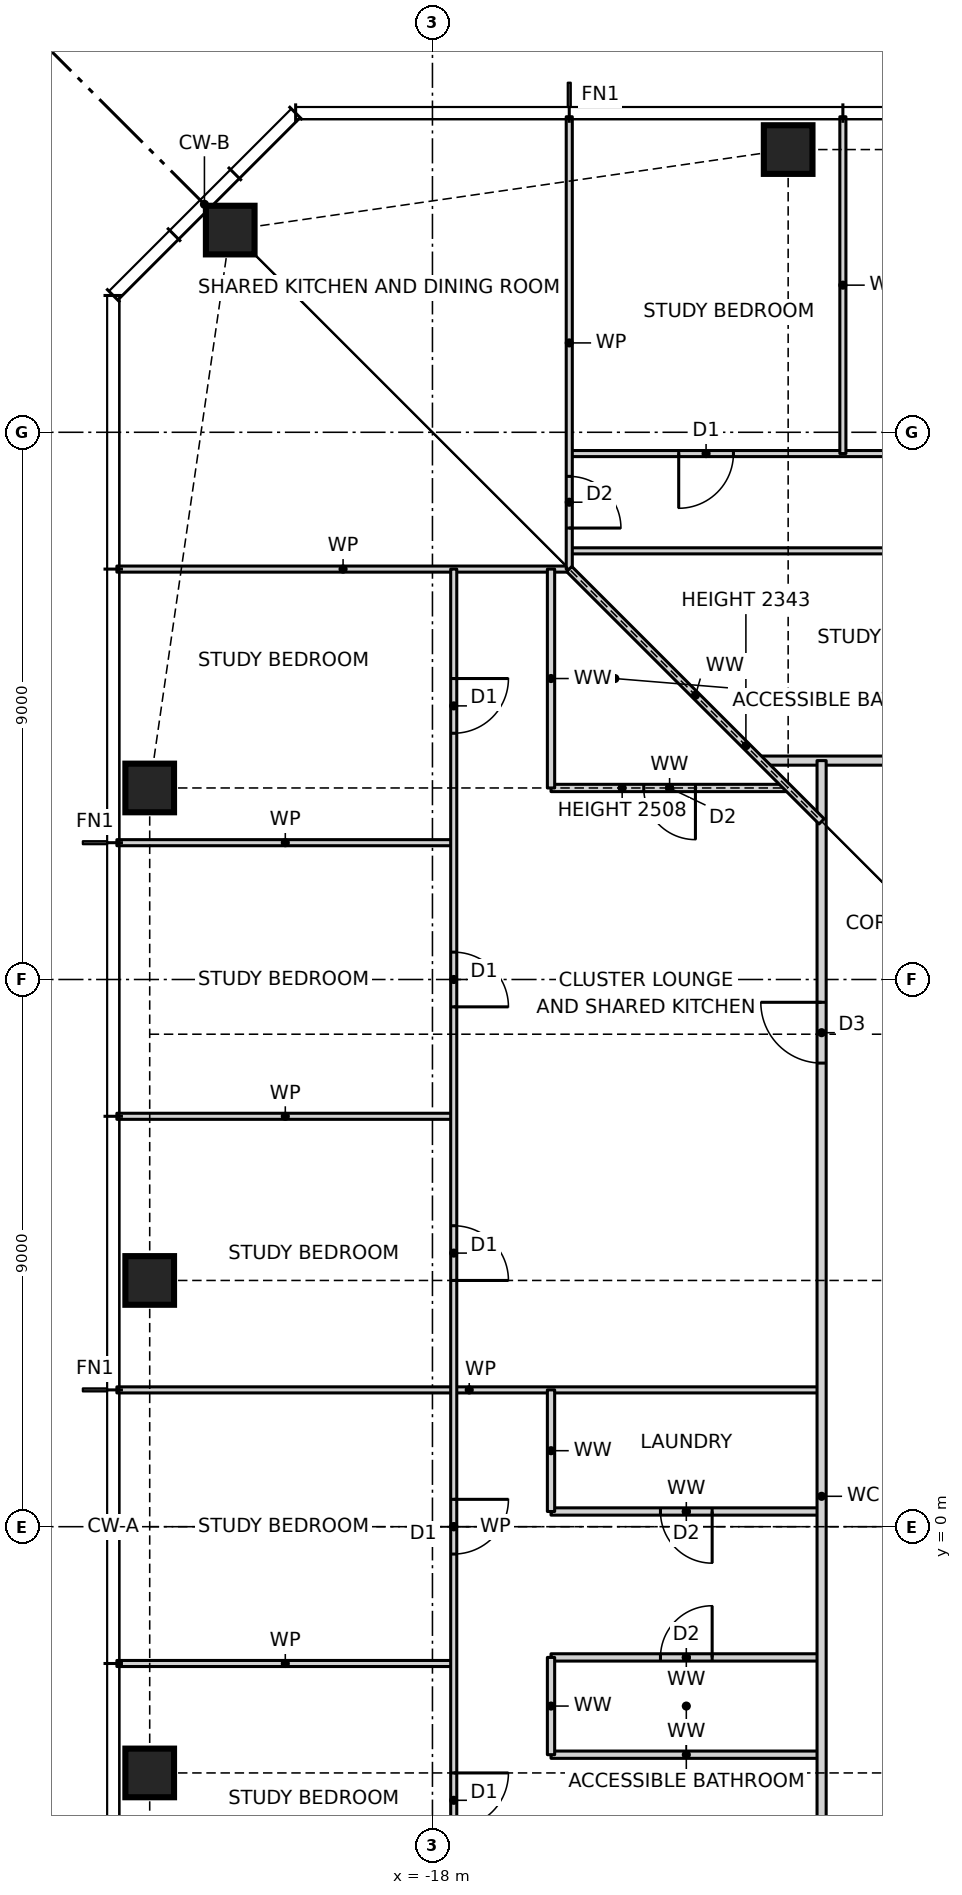
"""IFC4 building model, lengths in metres.
Left out: names, types, materials, properties, quantities, classifications, styles, units other than length and angle.
Written with IfcOpenShell. Run it as: python <this file> out.ifc"""

import sys

from ifc_helpers import new_model, si_unit, direction, frame, frame_2d, origin, origin_2d, place, context, subcontext, project, spatial, rectangle, hollow_rectangle, extrude, element, fill, save


model = new_model("IFC4")
c1 = context("Model", 3, precision=1e-05, world=origin(), true_north=direction((0.0, 1.0)))
c2 = subcontext(c1, "Body", "Model", "MODEL_VIEW")
j1 = project(units=[si_unit("LENGTHUNIT", "METRE"), si_unit("PLANEANGLEUNIT", "RADIAN")], contexts=[c1])
p1 = place(None, origin())
s1 = spatial("IfcSite", under=j1, at=p1, CompositionType="ELEMENT")
p2 = place(p1, origin())
s2 = spatial("IfcBuilding", under=s1, at=p2, CompositionType="ELEMENT")
p3 = place(p2, frame((0.0, 0.0, 64.0)))
s3 = spatial("IfcBuildingStorey", under=s2, at=p3, CompositionType="ELEMENT", Elevation=64.0)
for number, where, z_axis, x_axis in (
    (1, (-12.15, 22.65, 0.0), (0.0, 0.0, 1.0), (1.0, 0.0, 0.0)),
    (2, (-21.326, 21.326, 0.0), (0.0, 0.0, 1.0), (1.0, 0.0, 0.0)),
    (3, (-22.65, 12.15, 0.0), (0.0, 0.0, 1.0), (1.0, 0.0, 0.0)),
    (4, (-22.65, 4.05, 0.0), (0.0, 0.0, 1.0), (1.0, 0.0, 0.0)),
    (5, (-22.65, -4.05, 0.0), (0.0, 0.0, 1.0), (1.0, 0.0, 0.0)),
):
    element("IfcColumn", number, at=place(p3, frame(where, z_axis=z_axis, x_axis=x_axis)), inside=s3, PredefinedType="COLUMN", context=c2, shape_type="SweptSolid", body=[
        extrude(hollow_rectangle(XDim=0.8, YDim=0.8, WallThickness=0.09, at=origin_2d()), origin(), (0.0, 0.0, 1.0), 3.5),
    ])
p4 = place(p3, frame((-16.05, -3.75, 0.0), z_axis=(0.0, 0.0, 1.0), x_axis=(1.0, 0.0, 0.0)))
e6 = element("IfcWall", 6, at=p4, inside=s3, PredefinedType="PARTITIONING", context=c2, shape_type="SweptSolid", body=[
    extrude(rectangle(XDim=4.45, YDim=0.12, at=frame_2d((2.225, 0.0))), origin(), (0.0, 0.0, 1.0), 3.27),
])
p5 = place(p3, frame((-23.19, -2.25, 0.0), z_axis=(0.0, 0.0, 1.0), x_axis=(1.0, 0.0, 0.0)))
e7 = element("IfcWall", 7, at=p5, inside=s3, PredefinedType="PARTITIONING", context=c2, shape_type="SweptSolid", body=[
    extrude(rectangle(XDim=5.54, YDim=0.1, at=frame_2d((2.77, 0.0))), origin(), (0.0, 0.0, 1.0), 3.27),
])
p6 = place(p3, frame((-16.05, -2.15, 0.0), z_axis=(0.0, 0.0, 1.0), x_axis=(1.0, 0.0, 0.0)))
e8 = element("IfcWall", 8, at=p6, inside=s3, PredefinedType="PARTITIONING", context=c2, shape_type="SweptSolid", body=[
    extrude(rectangle(XDim=4.45, YDim=0.12, at=frame_2d((2.225, 0.0))), origin(), (0.0, 0.0, 1.0), 3.27),
])
p7 = place(p6, frame((1.8, 0.0, 0.0)))
e9 = element("IfcOpeningElement", 9, at=p7, cuts=e8, PredefinedType="OPENING", context=c2, shape_type="SweptSolid", body=[
    extrude(rectangle(XDim=0.85, YDim=2.1, at=frame_2d((0.425, 1.05))), frame((0.0, 0.07, 0.0), z_axis=(0.0, -1.0, 0.0), x_axis=(1.0, 0.0, 0.0)), (0.0, 0.0, 1.0), 0.14),
])
p8 = place(p3, frame((-16.05, 0.25, 0.0), z_axis=(0.0, 0.0, 1.0), x_axis=(1.0, 0.0, 0.0)))
e10 = element("IfcWall", 10, at=p8, inside=s3, PredefinedType="PARTITIONING", context=c2, shape_type="SweptSolid", body=[
    extrude(rectangle(XDim=4.45, YDim=0.12, at=frame_2d((2.225, 0.0))), origin(), (0.0, 0.0, 1.0), 3.27),
])
p9 = place(p8, frame((1.8, 0.0, 0.0)))
e11 = element("IfcOpeningElement", 11, at=p9, cuts=e10, PredefinedType="OPENING", context=c2, shape_type="SweptSolid", body=[
    extrude(rectangle(XDim=0.85, YDim=2.1, at=frame_2d((0.425, 1.05))), frame((0.0, 0.07, 0.0), z_axis=(0.0, -1.0, 0.0), x_axis=(1.0, 0.0, 0.0)), (0.0, 0.0, 1.0), 0.14),
])
p10 = place(p3, frame((-23.19, 2.25, 0.0), z_axis=(0.0, 0.0, 1.0), x_axis=(1.0, 0.0, 0.0)))
e12 = element("IfcWall", 12, at=p10, inside=s3, PredefinedType="PARTITIONING", context=c2, shape_type="SweptSolid", body=[
    extrude(rectangle(XDim=11.59, YDim=0.1, at=frame_2d((5.795, 0.0))), origin(), (0.0, 0.0, 1.0), 3.27),
])
for number, where, z_axis, x_axis in (
    (13, (-23.19, 6.75, 0.0), (0.0, 0.0, 1.0), (1.0, 0.0, 0.0)),
    (14, (-23.19, 11.25, 0.0), (0.0, 0.0, 1.0), (1.0, 0.0, 0.0)),
):
    element("IfcWall", number, at=place(p3, frame(where, z_axis=z_axis, x_axis=x_axis)), inside=s3, PredefinedType="PARTITIONING", context=c2, shape_type="SweptSolid", body=[
        extrude(rectangle(XDim=5.54, YDim=0.1, at=frame_2d((2.77, 0.0))), origin(), (0.0, 0.0, 1.0), 3.27),
    ])
p11 = place(p3, frame((-16.05, 12.15, 0.0), z_axis=(0.0, 0.0, 1.0), x_axis=(1.0, 0.0, 0.0)))
e15 = element("IfcWall", 15, at=p11, inside=s3, PredefinedType="PARTITIONING", context=c2, shape_type="SweptSolid", body=[
    extrude(rectangle(XDim=3.9, YDim=0.12, at=frame_2d((1.95, 0.0))), origin(), (0.0, 0.0, 1.0), 2.508),
])
p12 = place(p11, frame((1.525, 0.0, 0.0)))
e16 = element("IfcOpeningElement", 16, at=p12, cuts=e15, PredefinedType="OPENING", context=c2, shape_type="SweptSolid", body=[
    extrude(rectangle(XDim=0.85, YDim=2.1, at=frame_2d((0.425, 1.05))), frame((0.0, 0.07, 0.0), z_axis=(0.0, -1.0, 0.0), x_axis=(1.0, 0.0, 0.0)), (0.0, 0.0, 1.0), 0.14),
])
p13 = place(p3, frame((-12.6, 12.6, 0.0), z_axis=(0.0, 0.0, 1.0), x_axis=(1.0, 0.0, 0.0)))
e17 = element("IfcWall", 17, at=p13, inside=s3, PredefinedType="PARTITIONING", context=c2, shape_type="SweptSolid", body=[
    extrude(rectangle(XDim=25.2, YDim=0.15, at=frame_2d((12.6, 0.0))), origin(), (0.0, 0.0, 1.0), 3.27),
])
p14 = place(p13, frame((11.505, 0.0, 0.0)))
e18 = element("IfcOpeningElement", 18, at=p14, cuts=e17, PredefinedType="OPENING", context=c2, shape_type="SweptSolid", body=[
    extrude(rectangle(XDim=1.0, YDim=2.1, at=frame_2d((0.5, 1.05))), frame((0.0, 0.085, 0.0), z_axis=(0.0, -1.0, 0.0), x_axis=(1.0, 0.0, 0.0)), (0.0, 0.0, 1.0), 0.17),
])
p15 = place(p3, frame((-23.19, 15.75, 0.0), z_axis=(0.0, 0.0, 1.0), x_axis=(1.0, 0.0, 0.0)))
e19 = element("IfcWall", 19, at=p15, inside=s3, PredefinedType="PARTITIONING", context=c2, shape_type="SweptSolid", body=[
    extrude(rectangle(XDim=7.44, YDim=0.1, at=frame_2d((3.72, 0.0))), origin(), (0.0, 0.0, 1.0), 3.27),
])
p16 = place(p3, frame((-15.75, 16.05, 0.0), z_axis=(0.0, 0.0, 1.0), x_axis=(1.0, 0.0, 0.0)))
e20 = element("IfcWall", 20, at=p16, inside=s3, PredefinedType="PARTITIONING", context=c2, shape_type="SweptSolid", body=[
    extrude(rectangle(XDim=11.31, YDim=0.1, at=frame_2d((5.655, 0.0))), origin(), (0.0, 0.0, 1.0), 3.27),
])
p17 = place(p16, frame((5.23, 0.0, 0.0)))
e21 = element("IfcOpeningElement", 21, at=p17, cuts=e20, PredefinedType="OPENING", context=c2, shape_type="SweptSolid", body=[
    extrude(rectangle(XDim=0.85, YDim=2.1, at=frame_2d((0.425, 1.05))), frame((0.0, 0.06, 0.0), z_axis=(0.0, -1.0, 0.0), x_axis=(1.0, 0.0, 0.0)), (0.0, 0.0, 1.0), 0.12),
])
p18 = place(p3, frame((-15.75, 17.65, 0.0), z_axis=(0.0, 0.0, 1.0), x_axis=(1.0, 0.0, 0.0)))
e22 = element("IfcWall", 22, at=p18, inside=s3, PredefinedType="PARTITIONING", context=c2, shape_type="SweptSolid", body=[
    extrude(rectangle(XDim=27.0, YDim=0.1, at=frame_2d((13.5, 0.0))), origin(), (0.0, 0.0, 1.0), 3.27),
])
p19 = place(p18, frame((24.3, 0.0, 0.0)))
e23 = element("IfcOpeningElement", 23, at=p19, cuts=e22, PredefinedType="OPENING", context=c2, shape_type="SweptSolid", body=[
    extrude(rectangle(XDim=0.9, YDim=2.1, at=frame_2d((0.45, 1.05))), frame((0.0, 0.06, 0.0), z_axis=(0.0, -1.0, 0.0), x_axis=(1.0, 0.0, 0.0)), (0.0, 0.0, 1.0), 0.12),
])
p20 = place(p18, frame((19.8, 0.0, 0.0)))
e24 = element("IfcOpeningElement", 24, at=p20, cuts=e22, PredefinedType="OPENING", context=c2, shape_type="SweptSolid", body=[
    extrude(rectangle(XDim=0.9, YDim=2.1, at=frame_2d((0.45, 1.05))), frame((0.0, 0.06, 0.0), z_axis=(0.0, -1.0, 0.0), x_axis=(1.0, 0.0, 0.0)), (0.0, 0.0, 1.0), 0.12),
])
p21 = place(p18, frame((15.3, 0.0, 0.0)))
e25 = element("IfcOpeningElement", 25, at=p21, cuts=e22, PredefinedType="OPENING", context=c2, shape_type="SweptSolid", body=[
    extrude(rectangle(XDim=0.9, YDim=2.1, at=frame_2d((0.45, 1.05))), frame((0.0, 0.06, 0.0), z_axis=(0.0, -1.0, 0.0), x_axis=(1.0, 0.0, 0.0)), (0.0, 0.0, 1.0), 0.12),
])
p22 = place(p18, frame((10.8, 0.0, 0.0)))
e26 = element("IfcOpeningElement", 26, at=p22, cuts=e22, PredefinedType="OPENING", context=c2, shape_type="SweptSolid", body=[
    extrude(rectangle(XDim=0.9, YDim=2.1, at=frame_2d((0.45, 1.05))), frame((0.0, 0.06, 0.0), z_axis=(0.0, -1.0, 0.0), x_axis=(1.0, 0.0, 0.0)), (0.0, 0.0, 1.0), 0.12),
])
p23 = place(p18, frame((6.3, 0.0, 0.0)))
e27 = element("IfcOpeningElement", 27, at=p23, cuts=e22, PredefinedType="OPENING", context=c2, shape_type="SweptSolid", body=[
    extrude(rectangle(XDim=0.9, YDim=2.1, at=frame_2d((0.45, 1.05))), frame((0.0, 0.06, 0.0), z_axis=(0.0, -1.0, 0.0), x_axis=(1.0, 0.0, 0.0)), (0.0, 0.0, 1.0), 0.12),
])
p24 = place(p18, frame((1.8, 0.0, 0.0)))
e28 = element("IfcOpeningElement", 28, at=p24, cuts=e22, PredefinedType="OPENING", context=c2, shape_type="SweptSolid", body=[
    extrude(rectangle(XDim=0.9, YDim=2.1, at=frame_2d((0.45, 1.05))), frame((0.0, 0.06, 0.0), z_axis=(0.0, -1.0, 0.0), x_axis=(1.0, 0.0, 0.0)), (0.0, 0.0, 1.0), 0.12),
])
p25 = place(p3, frame((-11.25, 17.65, 0.0), z_axis=(0.0, 0.0, 1.0), x_axis=(0.0, 1.0, 0.0)))
e29 = element("IfcWall", 29, at=p25, inside=s3, PredefinedType="PARTITIONING", context=c2, shape_type="SweptSolid", body=[
    extrude(rectangle(XDim=5.54, YDim=0.1, at=frame_2d((2.77, 0.0))), origin(), (0.0, 0.0, 1.0), 3.27),
])
p26 = place(p3, frame((-11.6, -11.6, 0.0), z_axis=(0.0, 0.0, 1.0), x_axis=(0.0, 1.0, 0.0)))
e30 = element("IfcWall", 30, at=p26, inside=s3, PredefinedType="PARTITIONING", context=c2, shape_type="SweptSolid", body=[
    extrude(rectangle(XDim=24.2, YDim=0.15, at=frame_2d((12.1, 0.0))), origin(), (0.0, 0.0, 1.0), 3.27),
])
p27 = place(p26, frame((19.225, 0.0, 0.0)))
e31 = element("IfcOpeningElement", 31, at=p27, cuts=e30, PredefinedType="OPENING", context=c2, shape_type="SweptSolid", body=[
    extrude(rectangle(XDim=1.0, YDim=2.1, at=frame_2d((0.5, 1.05))), frame((0.0, 0.085, 0.0), z_axis=(0.0, -1.0, 0.0), x_axis=(1.0, 0.0, 0.0)), (0.0, 0.0, 1.0), 0.17),
])
p28 = place(p26, frame((3.425, 0.0, 0.0)))
e32 = element("IfcOpeningElement", 32, at=p28, cuts=e30, PredefinedType="OPENING", context=c2, shape_type="SweptSolid", body=[
    extrude(rectangle(XDim=1.0, YDim=2.1, at=frame_2d((0.5, 1.05))), frame((0.0, 0.085, 0.0), z_axis=(0.0, -1.0, 0.0), x_axis=(1.0, 0.0, 0.0)), (0.0, 0.0, 1.0), 0.17),
])
p29 = place(p3, frame((-15.75, 15.75, 0.0), z_axis=(0.0, 0.0, 1.0), x_axis=(0.0, 1.0, 0.0)))
e33 = element("IfcWall", 33, at=p29, inside=s3, PredefinedType="PARTITIONING", context=c2, shape_type="SweptSolid", body=[
    extrude(rectangle(XDim=7.44, YDim=0.1, at=frame_2d((3.72, 0.0))), origin(), (0.0, 0.0, 1.0), 3.27),
])
p30 = place(p29, frame((0.675, 0.0, 0.0)))
e34 = element("IfcOpeningElement", 34, at=p30, cuts=e33, PredefinedType="OPENING", context=c2, shape_type="SweptSolid", body=[
    extrude(rectangle(XDim=0.85, YDim=2.1, at=frame_2d((0.425, 1.05))), frame((0.0, 0.06, 0.0), z_axis=(0.0, -1.0, 0.0), x_axis=(1.0, 0.0, 0.0)), (0.0, 0.0, 1.0), 0.12),
])
p31 = place(p3, frame((-16.05, -3.75, 0.0), z_axis=(0.0, 0.0, 1.0), x_axis=(0.0, 1.0, 0.0)))
e35 = element("IfcWall", 35, at=p31, inside=s3, PredefinedType="PARTITIONING", context=c2, shape_type="SweptSolid", body=[
    extrude(rectangle(XDim=1.6, YDim=0.12, at=frame_2d((0.8, 0.0))), origin(), (0.0, 0.0, 1.0), 3.27),
])
p32 = place(p3, frame((-16.05, 0.25, 0.0), z_axis=(0.0, 0.0, 1.0), x_axis=(0.0, 1.0, 0.0)))
e36 = element("IfcWall", 36, at=p32, inside=s3, PredefinedType="PARTITIONING", context=c2, shape_type="SweptSolid", body=[
    extrude(rectangle(XDim=2.0, YDim=0.12, at=frame_2d((1.0, 0.0))), origin(), (0.0, 0.0, 1.0), 3.27),
])
p33 = place(p3, frame((-16.05, 12.15, 0.0), z_axis=(0.0, 0.0, 1.0), x_axis=(0.0, 1.0, 0.0)))
e37 = element("IfcWall", 37, at=p33, inside=s3, PredefinedType="PARTITIONING", context=c2, shape_type="SweptSolid", body=[
    extrude(rectangle(XDim=3.6, YDim=0.12, at=frame_2d((1.8, 0.0))), origin(), (0.0, 0.0, 1.0), 3.27),
])
p34 = place(p3, frame((-17.65, -15.75, 0.0), z_axis=(0.0, 0.0, 1.0), x_axis=(0.0, 1.0, 0.0)))
e38 = element("IfcWall", 38, at=p34, inside=s3, PredefinedType="PARTITIONING", context=c2, shape_type="SweptSolid", body=[
    extrude(rectangle(XDim=31.5, YDim=0.1, at=frame_2d((15.75, 0.0))), origin(), (0.0, 0.0, 1.0), 3.27),
])
p35 = place(p34, frame((28.8, 0.0, 0.0)))
e39 = element("IfcOpeningElement", 39, at=p35, cuts=e38, PredefinedType="OPENING", context=c2, shape_type="SweptSolid", body=[
    extrude(rectangle(XDim=0.9, YDim=2.1, at=frame_2d((0.45, 1.05))), frame((0.0, 0.06, 0.0), z_axis=(0.0, -1.0, 0.0), x_axis=(1.0, 0.0, 0.0)), (0.0, 0.0, 1.0), 0.12),
])
p36 = place(p34, frame((24.3, 0.0, 0.0)))
e40 = element("IfcOpeningElement", 40, at=p36, cuts=e38, PredefinedType="OPENING", context=c2, shape_type="SweptSolid", body=[
    extrude(rectangle(XDim=0.9, YDim=2.1, at=frame_2d((0.45, 1.05))), frame((0.0, 0.06, 0.0), z_axis=(0.0, -1.0, 0.0), x_axis=(1.0, 0.0, 0.0)), (0.0, 0.0, 1.0), 0.12),
])
p37 = place(p34, frame((19.8, 0.0, 0.0)))
e41 = element("IfcOpeningElement", 41, at=p37, cuts=e38, PredefinedType="OPENING", context=c2, shape_type="SweptSolid", body=[
    extrude(rectangle(XDim=0.9, YDim=2.1, at=frame_2d((0.45, 1.05))), frame((0.0, 0.06, 0.0), z_axis=(0.0, -1.0, 0.0), x_axis=(1.0, 0.0, 0.0)), (0.0, 0.0, 1.0), 0.12),
])
p38 = place(p34, frame((15.3, 0.0, 0.0)))
e42 = element("IfcOpeningElement", 42, at=p38, cuts=e38, PredefinedType="OPENING", context=c2, shape_type="SweptSolid", body=[
    extrude(rectangle(XDim=0.9, YDim=2.1, at=frame_2d((0.45, 1.05))), frame((0.0, 0.06, 0.0), z_axis=(0.0, -1.0, 0.0), x_axis=(1.0, 0.0, 0.0)), (0.0, 0.0, 1.0), 0.12),
])
p39 = place(p34, frame((10.8, 0.0, 0.0)))
e43 = element("IfcOpeningElement", 43, at=p39, cuts=e38, PredefinedType="OPENING", context=c2, shape_type="SweptSolid", body=[
    extrude(rectangle(XDim=0.9, YDim=2.1, at=frame_2d((0.45, 1.05))), frame((0.0, 0.06, 0.0), z_axis=(0.0, -1.0, 0.0), x_axis=(1.0, 0.0, 0.0)), (0.0, 0.0, 1.0), 0.12),
])
p40 = place(p34, frame((6.3, 0.0, 0.0)))
e44 = element("IfcOpeningElement", 44, at=p40, cuts=e38, PredefinedType="OPENING", context=c2, shape_type="SweptSolid", body=[
    extrude(rectangle(XDim=0.9, YDim=2.1, at=frame_2d((0.45, 1.05))), frame((0.0, 0.06, 0.0), z_axis=(0.0, -1.0, 0.0), x_axis=(1.0, 0.0, 0.0)), (0.0, 0.0, 1.0), 0.12),
])
p41 = place(p34, frame((1.8, 0.0, 0.0)))
e45 = element("IfcOpeningElement", 45, at=p41, cuts=e38, PredefinedType="OPENING", context=c2, shape_type="SweptSolid", body=[
    extrude(rectangle(XDim=0.9, YDim=2.1, at=frame_2d((0.45, 1.05))), frame((0.0, 0.06, 0.0), z_axis=(0.0, -1.0, 0.0), x_axis=(1.0, 0.0, 0.0)), (0.0, 0.0, 1.0), 0.12),
])
p42 = place(p3, frame((-11.6, 11.6, 0.0), z_axis=(0.0, 0.0, 1.0), x_axis=(-0.707106781187, 0.707106781187, 0.0)))
e46 = element("IfcWall", 46, at=p42, inside=s3, PredefinedType="PARTITIONING", context=c2, shape_type="SweptSolid", body=[
    extrude(rectangle(XDim=5.869, YDim=0.12, at=frame_2d((2.935, 0.0))), origin(), (0.0, 0.0, 1.0), 2.343),
])
p43 = place(p24, frame((0.9, 0.0, 0.0), z_axis=(0.0, 0.0, 1.0), x_axis=(-1.0, 0.0, 0.0)))
e47 = element("IfcDoor", 47, at=p43, inside=s3, OperationType="SINGLE_SWING_RIGHT", PredefinedType="DOOR", context=c2, shape_type="SweptSolid", body=[
    extrude(rectangle(XDim=0.9, YDim=2.1, at=frame_2d((0.45, 1.05))), frame((0.0, 0.025, 0.0), z_axis=(0.0, -1.0, 0.0), x_axis=(1.0, 0.0, 0.0)), (0.0, 0.0, 1.0), 0.05),
])
fill(e28, e47)
p44 = place(p35, frame((0.9, 0.0, 0.0), z_axis=(0.0, 0.0, 1.0), x_axis=(-1.0, 0.0, 0.0)))
e48 = element("IfcDoor", 48, at=p44, inside=s3, OperationType="SINGLE_SWING_LEFT", PredefinedType="DOOR", context=c2, shape_type="SweptSolid", body=[
    extrude(rectangle(XDim=0.9, YDim=2.1, at=frame_2d((0.45, 1.05))), frame((0.0, 0.025, 0.0), z_axis=(0.0, -1.0, 0.0), x_axis=(1.0, 0.0, 0.0)), (0.0, 0.0, 1.0), 0.05),
])
fill(e39, e48)
p45 = place(p36, frame((0.9, 0.0, 0.0), z_axis=(0.0, 0.0, 1.0), x_axis=(-1.0, 0.0, 0.0)))
e49 = element("IfcDoor", 49, at=p45, inside=s3, OperationType="SINGLE_SWING_RIGHT", PredefinedType="DOOR", context=c2, shape_type="SweptSolid", body=[
    extrude(rectangle(XDim=0.9, YDim=2.1, at=frame_2d((0.45, 1.05))), frame((0.0, 0.025, 0.0), z_axis=(0.0, -1.0, 0.0), x_axis=(1.0, 0.0, 0.0)), (0.0, 0.0, 1.0), 0.05),
])
fill(e40, e49)
p46 = place(p37, frame((0.9, 0.0, 0.0), z_axis=(0.0, 0.0, 1.0), x_axis=(-1.0, 0.0, 0.0)))
e50 = element("IfcDoor", 50, at=p46, inside=s3, OperationType="SINGLE_SWING_RIGHT", PredefinedType="DOOR", context=c2, shape_type="SweptSolid", body=[
    extrude(rectangle(XDim=0.9, YDim=2.1, at=frame_2d((0.45, 1.05))), frame((0.0, 0.025, 0.0), z_axis=(0.0, -1.0, 0.0), x_axis=(1.0, 0.0, 0.0)), (0.0, 0.0, 1.0), 0.05),
])
fill(e41, e50)
p47 = place(p27, origin())
e51 = element("IfcDoor", 51, at=p47, inside=s3, OperationType="SINGLE_SWING_RIGHT", PredefinedType="DOOR", context=c2, shape_type="SweptSolid", body=[
    extrude(rectangle(XDim=1.0, YDim=2.1, at=frame_2d((0.5, 1.05))), frame((0.0, 0.025, 0.0), z_axis=(0.0, -1.0, 0.0), x_axis=(1.0, 0.0, 0.0)), (0.0, 0.0, 1.0), 0.05),
])
fill(e31, e51)
p48 = place(p12, frame((0.85, 0.0, 0.0), z_axis=(0.0, 0.0, 1.0), x_axis=(-1.0, 0.0, 0.0)))
e52 = element("IfcDoor", 52, at=p48, inside=s3, OperationType="SINGLE_SWING_LEFT", PredefinedType="DOOR", context=c2, shape_type="SweptSolid", body=[
    extrude(rectangle(XDim=0.85, YDim=2.1, at=frame_2d((0.425, 1.05))), frame((0.0, 0.025, 0.0), z_axis=(0.0, -1.0, 0.0), x_axis=(1.0, 0.0, 0.0)), (0.0, 0.0, 1.0), 0.05),
])
fill(e16, e52)
p49 = place(p38, frame((0.9, 0.0, 0.0), z_axis=(0.0, 0.0, 1.0), x_axis=(-1.0, 0.0, 0.0)))
e53 = element("IfcDoor", 53, at=p49, inside=s3, OperationType="SINGLE_SWING_LEFT", PredefinedType="DOOR", context=c2, shape_type="SweptSolid", body=[
    extrude(rectangle(XDim=0.9, YDim=2.1, at=frame_2d((0.45, 1.05))), frame((0.0, 0.025, 0.0), z_axis=(0.0, -1.0, 0.0), x_axis=(1.0, 0.0, 0.0)), (0.0, 0.0, 1.0), 0.05),
])
fill(e42, e53)
p50 = place(p39, frame((0.9, 0.0, 0.0), z_axis=(0.0, 0.0, 1.0), x_axis=(-1.0, 0.0, 0.0)))
e54 = element("IfcDoor", 54, at=p50, inside=s3, OperationType="SINGLE_SWING_LEFT", PredefinedType="DOOR", context=c2, shape_type="SweptSolid", body=[
    extrude(rectangle(XDim=0.9, YDim=2.1, at=frame_2d((0.45, 1.05))), frame((0.0, 0.025, 0.0), z_axis=(0.0, -1.0, 0.0), x_axis=(1.0, 0.0, 0.0)), (0.0, 0.0, 1.0), 0.05),
])
fill(e43, e54)
p51 = place(p9, frame((0.85, 0.0, 0.0), z_axis=(0.0, 0.0, 1.0), x_axis=(-1.0, 0.0, 0.0)))
e55 = element("IfcDoor", 55, at=p51, inside=s3, OperationType="SINGLE_SWING_LEFT", PredefinedType="DOOR", context=c2, shape_type="SweptSolid", body=[
    extrude(rectangle(XDim=0.85, YDim=2.1, at=frame_2d((0.425, 1.05))), frame((0.0, 0.025, 0.0), z_axis=(0.0, -1.0, 0.0), x_axis=(1.0, 0.0, 0.0)), (0.0, 0.0, 1.0), 0.05),
])
fill(e11, e55)
p52 = place(p7, origin())
e56 = element("IfcDoor", 56, at=p52, inside=s3, OperationType="SINGLE_SWING_RIGHT", PredefinedType="DOOR", context=c2, shape_type="SweptSolid", body=[
    extrude(rectangle(XDim=0.85, YDim=2.1, at=frame_2d((0.425, 1.05))), frame((0.0, 0.025, 0.0), z_axis=(0.0, -1.0, 0.0), x_axis=(1.0, 0.0, 0.0)), (0.0, 0.0, 1.0), 0.05),
])
fill(e9, e56)
p53 = place(p30, frame((0.85, 0.0, 0.0), z_axis=(0.0, 0.0, 1.0), x_axis=(-1.0, 0.0, 0.0)))
e57 = element("IfcDoor", 57, at=p53, inside=s3, OperationType="SINGLE_SWING_RIGHT", PredefinedType="DOOR", context=c2, shape_type="SweptSolid", body=[
    extrude(rectangle(XDim=0.85, YDim=2.1, at=frame_2d((0.425, 1.05))), frame((0.0, 0.025, 0.0), z_axis=(0.0, -1.0, 0.0), x_axis=(1.0, 0.0, 0.0)), (0.0, 0.0, 1.0), 0.05),
])
fill(e34, e57)
save(model, sys.argv[1])
